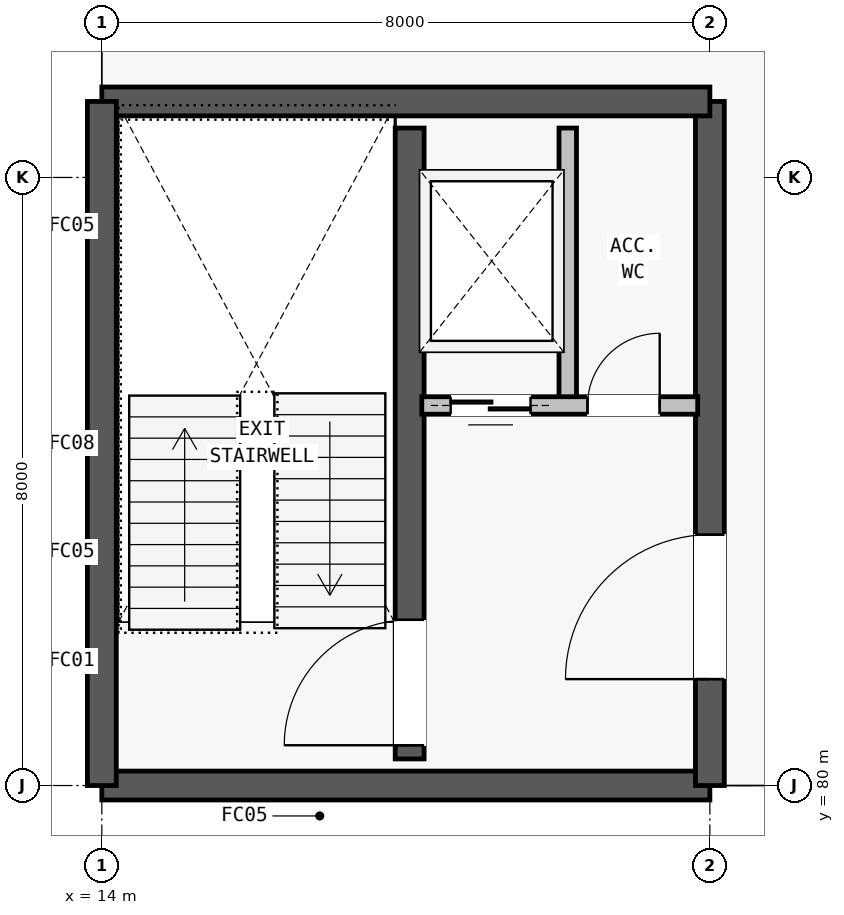
"""IFC4 building model, lengths in metres.
Left out: names, types, materials, properties, quantities, classifications, styles, units other than length and angle.
Written with IfcOpenShell. Run it as: python <this file> out.ifc"""

import sys

from ifc_helpers import new_model, si_unit, direction, frame, frame_2d, origin, place, context, subcontext, project, spatial, rectangle, extrude, element, fill, save


model = new_model("IFC4")
c1 = context("Model", 3, precision=1e-05, world=origin(), true_north=direction((0.0, 1.0)))
c2 = subcontext(c1, "Body", "Model", "MODEL_VIEW")
j1 = project(units=[si_unit("LENGTHUNIT", "METRE"), si_unit("PLANEANGLEUNIT", "RADIAN")], contexts=[c1])
p1 = place(None, origin())
s1 = spatial("IfcSite", under=j1, at=p1, CompositionType="ELEMENT")
p2 = place(p1, origin())
s2 = spatial("IfcBuilding", under=s1, at=p2, CompositionType="ELEMENT")
p3 = place(p2, frame((0.0, 0.0, 9.5)))
s3 = spatial("IfcBuildingStorey", under=s2, at=p3, CompositionType="ELEMENT", Elevation=9.5)
p4 = place(p3, frame((14.0, 80.0, 0.0), z_axis=(0.0, 0.0, 1.0), x_axis=(1.0, 0.0, 0.0)))
e1 = element("IfcWall", 1, at=p4, inside=s3, PredefinedType="SHEAR", context=c2, shape_type="SweptSolid", body=[
    extrude(rectangle(XDim=8.0, YDim=0.38, at=frame_2d((4.0, 0.0))), origin(), (0.0, 0.0, 1.0), 3.62),
])
p5 = place(p3, frame((22.0, 80.0, 0.0), z_axis=(0.0, 0.0, 1.0), x_axis=(0.0, 1.0, 0.0)))
e2 = element("IfcWall", 2, at=p5, inside=s3, PredefinedType="SHEAR", context=c2, shape_type="SweptSolid", body=[
    extrude(rectangle(XDim=9.0, YDim=0.38, at=frame_2d((4.5, 0.0))), origin(), (0.0, 0.0, 1.0), 3.62),
])
p6 = place(p5, frame((1.4, 0.0, 0.0)))
e3 = element("IfcOpeningElement", 3, at=p6, cuts=e2, PredefinedType="OPENING", context=c2, shape_type="SweptSolid", body=[
    extrude(rectangle(XDim=1.9, YDim=2.3, at=frame_2d((0.95, 1.15))), frame((0.0, 0.2, 0.0), z_axis=(0.0, -1.0, 0.0), x_axis=(1.0, 0.0, 0.0)), (0.0, 0.0, 1.0), 0.4),
])
p7 = place(p3, frame((22.0, 89.0, 0.0), z_axis=(0.0, 0.0, 1.0), x_axis=(-1.0, 0.0, 0.0)))
e4 = element("IfcWall", 4, at=p7, inside=s3, PredefinedType="SHEAR", context=c2, shape_type="SweptSolid", body=[
    extrude(rectangle(XDim=8.0, YDim=0.38, at=frame_2d((4.0, 0.0))), origin(), (0.0, 0.0, 1.0), 3.62),
])
p8 = place(p3, frame((14.0, 89.0, 0.0), z_axis=(0.0, 0.0, 1.0), x_axis=(0.0, -1.0, 0.0)))
e5 = element("IfcWall", 5, at=p8, inside=s3, PredefinedType="SHEAR", context=c2, shape_type="SweptSolid", body=[
    extrude(rectangle(XDim=9.0, YDim=0.38, at=frame_2d((4.5, 0.0))), origin(), (0.0, 0.0, 1.0), 3.62),
])
p9 = place(p3, frame((18.05, 80.35, 0.0), z_axis=(0.0, 0.0, 1.0), x_axis=(0.0, 1.0, 0.0)))
e6 = element("IfcWall", 6, at=p9, inside=s3, PredefinedType="SHEAR", context=c2, shape_type="SweptSolid", body=[
    extrude(rectangle(XDim=8.3, YDim=0.38, at=frame_2d((4.15, 0.0))), origin(), (0.0, 0.0, 1.0), 3.62),
])
p10 = place(p9, frame((0.18, 0.0, 0.0)))
e7 = element("IfcOpeningElement", 7, at=p10, cuts=e6, PredefinedType="OPENING", context=c2, shape_type="SweptSolid", body=[
    extrude(rectangle(XDim=1.65, YDim=2.2, at=frame_2d((0.825, 1.1))), frame((0.0, 0.2, 0.0), z_axis=(0.0, -1.0, 0.0), x_axis=(1.0, 0.0, 0.0)), (0.0, 0.0, 1.0), 0.4),
])
p11 = place(p3, frame((20.13, 85.0, 0.0), z_axis=(0.0, 0.0, 1.0), x_axis=(0.0, 1.0, 0.0)))
e8 = element("IfcWall", 8, at=p11, inside=s3, PredefinedType="PARTITIONING", context=c2, shape_type="SweptSolid", body=[
    extrude(rectangle(XDim=3.65, YDim=0.23, at=frame_2d((1.825, 0.0))), origin(), (0.0, 0.0, 1.0), 2.48),
])
p12 = place(p3, frame((18.21, 85.0, 0.0), z_axis=(0.0, 0.0, 1.0), x_axis=(1.0, 0.0, 0.0)))
e9 = element("IfcWall", 9, at=p12, inside=s3, PredefinedType="PARTITIONING", context=c2, shape_type="SweptSolid", body=[
    extrude(rectangle(XDim=3.63, YDim=0.23, at=frame_2d((1.815, 0.0))), origin(), (0.0, 0.0, 1.0), 2.48),
])
p13 = place(p12, frame((0.38, 0.0, 0.0)))
e10 = element("IfcOpeningElement", 10, at=p13, cuts=e9, PredefinedType="OPENING", context=c2, shape_type="SweptSolid", body=[
    extrude(rectangle(XDim=1.05, YDim=2.15, at=frame_2d((0.525, 1.075))), frame((0.0, 0.125, 0.0), z_axis=(0.0, -1.0, 0.0), x_axis=(1.0, 0.0, 0.0)), (0.0, 0.0, 1.0), 0.25),
])
p14 = place(p12, frame((2.18, 0.0, 0.0)))
e11 = element("IfcOpeningElement", 11, at=p14, cuts=e9, PredefinedType="OPENING", context=c2, shape_type="SweptSolid", body=[
    extrude(rectangle(XDim=0.95, YDim=2.1, at=frame_2d((0.475, 1.05))), frame((0.0, 0.125, 0.0), z_axis=(0.0, -1.0, 0.0), x_axis=(1.0, 0.0, 0.0)), (0.0, 0.0, 1.0), 0.25),
])
p15 = place(p6, origin())
e12 = element("IfcDoor", 12, at=p15, inside=s3, OperationType="SINGLE_SWING_LEFT", PredefinedType="DOOR", context=c2, shape_type="SweptSolid", body=[
    extrude(rectangle(XDim=1.9, YDim=2.3, at=frame_2d((0.95, 1.15))), frame((0.0, 0.025, 0.0), z_axis=(0.0, -1.0, 0.0), x_axis=(1.0, 0.0, 0.0)), (0.0, 0.0, 1.0), 0.05),
])
fill(e3, e12)
p16 = place(p10, origin())
e13 = element("IfcDoor", 13, at=p16, inside=s3, OperationType="SINGLE_SWING_LEFT", PredefinedType="DOOR", context=c2, shape_type="SweptSolid", body=[
    extrude(rectangle(XDim=1.65, YDim=2.2, at=frame_2d((0.825, 1.1))), frame((0.0, 0.025, 0.0), z_axis=(0.0, -1.0, 0.0), x_axis=(1.0, 0.0, 0.0)), (0.0, 0.0, 1.0), 0.05),
])
fill(e7, e13)
p17 = place(p13, origin())
e14 = element("IfcDoor", 14, at=p17, inside=s3, OperationType="SLIDING_TO_LEFT", PredefinedType="DOOR", context=c2, shape_type="SweptSolid", body=[
    extrude(rectangle(XDim=1.05, YDim=2.15, at=frame_2d((0.525, 1.075))), frame((0.0, 0.025, 0.0), z_axis=(0.0, -1.0, 0.0), x_axis=(1.0, 0.0, 0.0)), (0.0, 0.0, 1.0), 0.05),
])
fill(e10, e14)
p18 = place(p14, origin())
e15 = element("IfcDoor", 15, at=p18, inside=s3, OperationType="SINGLE_SWING_RIGHT", PredefinedType="DOOR", context=c2, shape_type="SweptSolid", body=[
    extrude(rectangle(XDim=0.95, YDim=2.1, at=frame_2d((0.475, 1.05))), frame((0.0, 0.025, 0.0), z_axis=(0.0, -1.0, 0.0), x_axis=(1.0, 0.0, 0.0)), (0.0, 0.0, 1.0), 0.05),
])
fill(e11, e15)
save(model, sys.argv[1])
